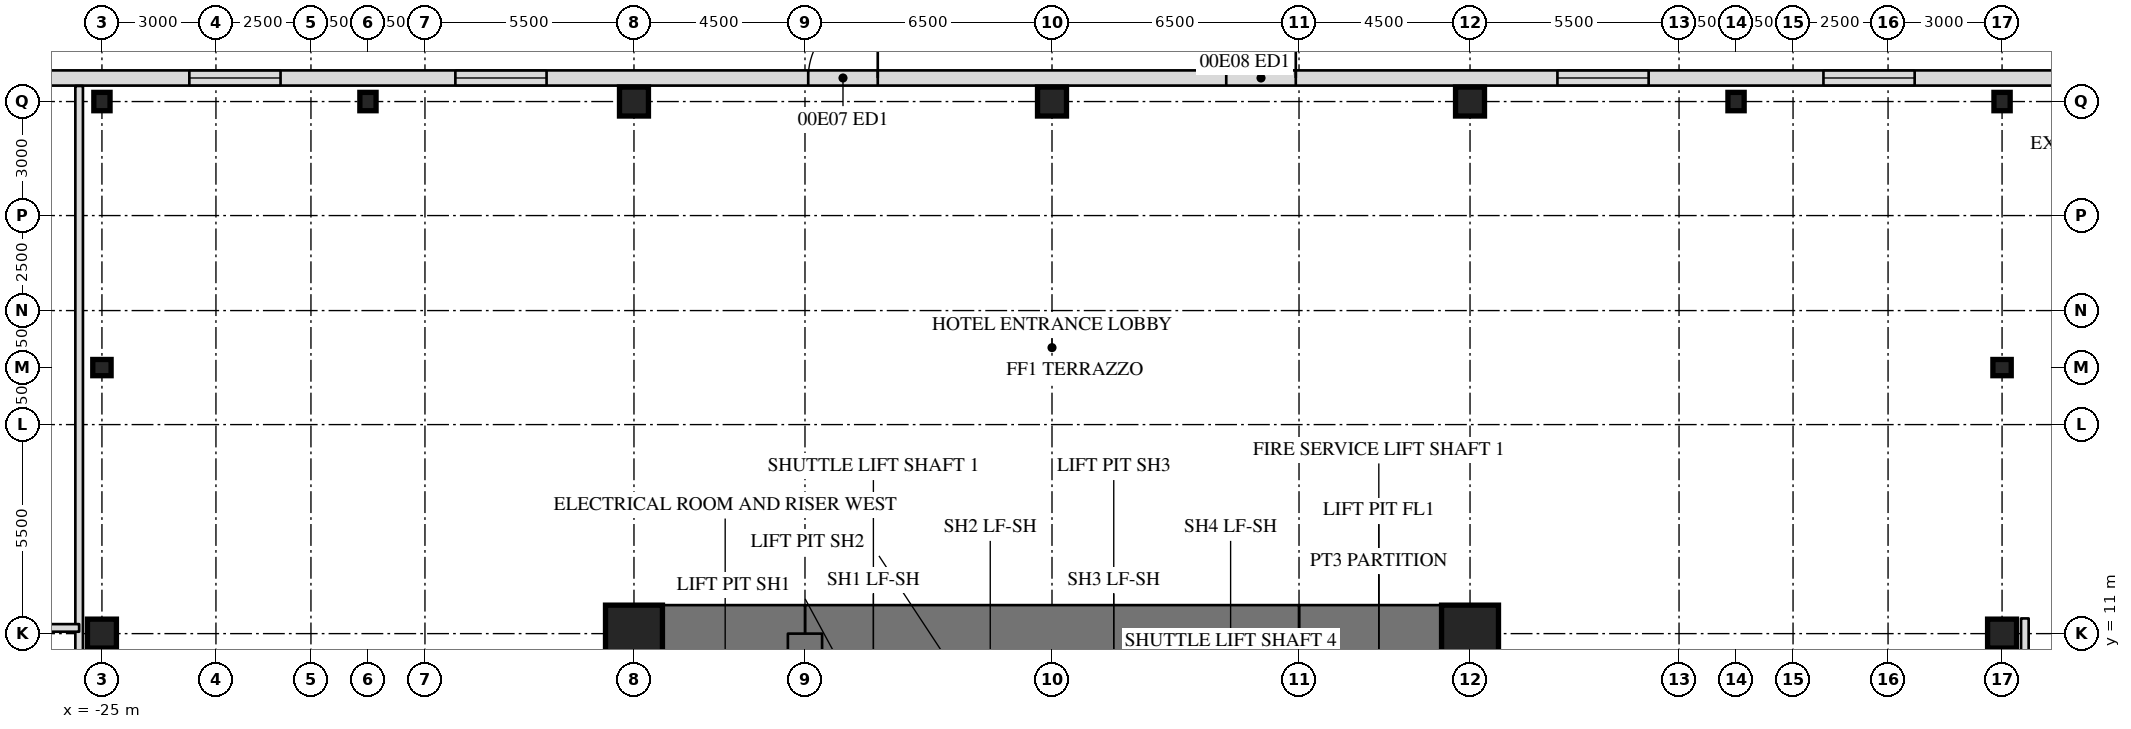
"""IFC4 building model, lengths in metres.
Left out: names, types, materials, properties, quantities, classifications, styles, units other than length and angle.
Written with IfcOpenShell. Run it as: python <this file> out.ifc"""

import sys

from ifc_helpers import new_model, si_unit, direction, frame, frame_2d, origin, origin_2d, place, context, subcontext, project, spatial, rectangle, hollow_rectangle, i_section, extrude, element, fill, save


model = new_model("IFC4")
c1 = context("Model", 3, precision=1e-05, world=origin(), true_north=direction((0.0, 1.0)))
c2 = subcontext(c1, "Body", "Model", "MODEL_VIEW")
j1 = project(units=[si_unit("LENGTHUNIT", "METRE"), si_unit("PLANEANGLEUNIT", "RADIAN")], contexts=[c1])
p1 = place(None, origin())
s1 = spatial("IfcSite", under=j1, at=p1, CompositionType="ELEMENT")
p2 = place(p1, origin())
s2 = spatial("IfcBuilding", under=s1, at=p2, CompositionType="ELEMENT")
p3 = place(p2, origin())
s3 = spatial("IfcBuildingStorey", under=s2, at=p3, CompositionType="ELEMENT", Elevation=0.0)
p4 = place(p3, frame((25.0, 11.0, -0.3), z_axis=(0.0, 0.0, 1.0), x_axis=(0.0, 1.0, 0.0)))
e1 = element("IfcColumn", 1, at=p4, inside=s3, PredefinedType="COLUMN", context=c2, shape_type="SweptSolid", body=[
    extrude(hollow_rectangle(XDim=0.762, YDim=0.762, WallThickness=0.152, at=origin_2d()), origin(), (0.0, 0.0, 1.0), 6.3),
])
for number, where, z_axis, x_axis in (
    (2, (25.0, 18.0, -0.3), (0.0, 0.0, 1.0), (0.0, 1.0, 0.0)),
    (3, (25.0, 25.0, -0.3), (0.0, 0.0, 1.0), (1.0, 0.0, 0.0)),
    (4, (18.0, 25.0, -0.3), (0.0, 0.0, 1.0), (1.0, 0.0, 0.0)),
):
    element("IfcColumn", number, at=place(p3, frame(where, z_axis=z_axis, x_axis=x_axis)), inside=s3, PredefinedType="COLUMN", context=c2, shape_type="SweptSolid", body=[
        extrude(i_section(OverallWidth=0.427, OverallDepth=0.483, WebThickness=0.051, FlangeThickness=0.082, at=origin_2d()), origin(), (0.0, 0.0, 1.0), 6.3),
    ])
for number, where, z_axis, x_axis in (
    (5, (11.0, 25.0, -0.3), (0.0, 0.0, 1.0), (1.0, 0.0, 0.0)),
    (6, (0.0, 25.0, -0.3), (0.0, 0.0, 1.0), (1.0, 0.0, 0.0)),
    (7, (-11.0, 25.0, -0.3), (0.0, 0.0, 1.0), (1.0, 0.0, 0.0)),
):
    element("IfcColumn", number, at=place(p3, frame(where, z_axis=z_axis, x_axis=x_axis)), inside=s3, PredefinedType="COLUMN", context=c2, shape_type="SweptSolid", body=[
        extrude(hollow_rectangle(XDim=0.762, YDim=0.762, WallThickness=0.152, at=origin_2d()), origin(), (0.0, 0.0, 1.0), 6.3),
    ])
for number, where, z_axis, x_axis in (
    (8, (-18.0, 25.0, -0.3), (0.0, 0.0, 1.0), (1.0, 0.0, 0.0)),
    (9, (-25.0, 25.0, -0.3), (0.0, 0.0, 1.0), (1.0, 0.0, 0.0)),
    (10, (-25.0, 18.0, -0.3), (0.0, 0.0, 1.0), (0.0, 1.0, 0.0)),
):
    element("IfcColumn", number, at=place(p3, frame(where, z_axis=z_axis, x_axis=x_axis)), inside=s3, PredefinedType="COLUMN", context=c2, shape_type="SweptSolid", body=[
        extrude(i_section(OverallWidth=0.427, OverallDepth=0.483, WebThickness=0.051, FlangeThickness=0.082, at=origin_2d()), origin(), (0.0, 0.0, 1.0), 6.3),
    ])
p5 = place(p3, frame((-25.0, 11.0, -0.3), z_axis=(0.0, 0.0, 1.0), x_axis=(0.0, 1.0, 0.0)))
e11 = element("IfcColumn", 11, at=p5, inside=s3, PredefinedType="COLUMN", context=c2, shape_type="SweptSolid", body=[
    extrude(hollow_rectangle(XDim=0.762, YDim=0.762, WallThickness=0.152, at=origin_2d()), origin(), (0.0, 0.0, 1.0), 6.3),
])
p6 = place(p3, frame((11.0, -11.0, -0.3), z_axis=(0.0, 0.0, 1.0), x_axis=(0.0, 1.0, 0.0)))
e12 = element("IfcWall", 12, at=p6, inside=s3, PredefinedType="SHEAR", context=c2, shape_type="SweptSolid", body=[
    extrude(rectangle(XDim=22.0, YDim=1.5, at=frame_2d((11.0, 0.0))), origin(), (0.0, 0.0, 1.0), 6.3),
])
p7 = place(p6, frame((15.393, 0.0, 0.3)))
e13 = element("IfcOpeningElement", 13, at=p7, cuts=e12, PredefinedType="OPENING", context=c2, shape_type="SweptSolid", body=[
    extrude(rectangle(XDim=0.915, YDim=2.134, at=frame_2d((0.458, 1.067))), frame((0.0, 0.76, 0.0), z_axis=(0.0, -1.0, 0.0), x_axis=(1.0, 0.0, 0.0)), (0.0, 0.0, 1.0), 1.52),
])
p8 = place(p3, frame((-11.0, 11.0, -0.3), z_axis=(0.0, 0.0, 1.0), x_axis=(0.0, -1.0, 0.0)))
e14 = element("IfcWall", 14, at=p8, inside=s3, PredefinedType="SHEAR", context=c2, shape_type="SweptSolid", body=[
    extrude(rectangle(XDim=22.0, YDim=1.5, at=frame_2d((11.0, 0.0))), origin(), (0.0, 0.0, 1.0), 6.3),
])
p9 = place(p8, frame((15.393, 0.0, 0.3)))
e15 = element("IfcOpeningElement", 15, at=p9, cuts=e14, PredefinedType="OPENING", context=c2, shape_type="SweptSolid", body=[
    extrude(rectangle(XDim=0.915, YDim=2.134, at=frame_2d((0.458, 1.067))), frame((0.0, 0.76, 0.0), z_axis=(0.0, -1.0, 0.0), x_axis=(1.0, 0.0, 0.0)), (0.0, 0.0, 1.0), 1.52),
])
p10 = place(p3, frame((11.0, 11.0, -0.3), z_axis=(0.0, 0.0, 1.0), x_axis=(-1.0, 0.0, 0.0)))
e16 = element("IfcWall", 16, at=p10, inside=s3, PredefinedType="SHEAR", context=c2, shape_type="SweptSolid", body=[
    extrude(rectangle(XDim=4.5, YDim=1.5, at=frame_2d((2.25, 0.0))), origin(), (0.0, 0.0, 1.0), 6.3),
])
p11 = place(p3, frame((6.5, 11.0, -0.3), z_axis=(0.0, 0.0, 1.0), x_axis=(-1.0, 0.0, 0.0)))
e17 = element("IfcWall", 17, at=p11, inside=s3, PredefinedType="SHEAR", context=c2, shape_type="SweptSolid", body=[
    extrude(rectangle(XDim=13.0, YDim=1.5, at=frame_2d((6.5, 0.0))), origin(), (0.0, 0.0, 1.0), 6.3),
])
p12 = place(p3, frame((-6.5, 11.0, -0.3), z_axis=(0.0, 0.0, 1.0), x_axis=(-1.0, 0.0, 0.0)))
e18 = element("IfcWall", 18, at=p12, inside=s3, PredefinedType="SHEAR", context=c2, shape_type="SweptSolid", body=[
    extrude(rectangle(XDim=4.5, YDim=1.5, at=frame_2d((2.25, 0.0))), origin(), (0.0, 0.0, 1.0), 6.3),
])
for number, where, z_axis, x_axis in (
    (19, (6.5, 6.5, -0.3), (0.0, 0.0, 1.0), (0.0, 1.0, 0.0)),
    (20, (-6.5, 11.0, -0.3), (0.0, 0.0, 1.0), (0.0, -1.0, 0.0)),
):
    element("IfcWall", number, at=place(p3, frame(where, z_axis=z_axis, x_axis=x_axis)), inside=s3, PredefinedType="SHEAR", context=c2, shape_type="SweptSolid", body=[
        extrude(rectangle(XDim=4.5, YDim=0.9, at=frame_2d((2.25, 0.0))), origin(), (0.0, 0.0, 1.0), 6.3),
    ])
for number, where, z_axis, x_axis in (
    (21, (11.0, 11.0, -0.3), (0.0, 0.0, 1.0), (1.0, 0.0, 0.0)),
    (22, (-11.0, 11.0, -0.3), (0.0, 0.0, 1.0), (1.0, 0.0, 0.0)),
):
    element("IfcColumn", number, at=place(p3, frame(where, z_axis=z_axis, x_axis=x_axis)), inside=s3, PredefinedType="COLUMN", context=c2, shape_type="SweptSolid", body=[
        extrude(hollow_rectangle(XDim=1.499, YDim=1.499, WallThickness=0.102, at=origin_2d()), origin(), (0.0, 0.0, 1.0), 6.3),
    ])
p13 = place(p3, frame((39.82, 25.62, -0.3), z_axis=(0.0, 0.0, 1.0), x_axis=(-1.0, 0.0, 0.0)))
e23 = element("IfcWall", 23, at=p13, inside=s3, PredefinedType="SOLIDWALL", context=c2, shape_type="SweptSolid", body=[
    extrude(rectangle(XDim=79.64, YDim=0.4, at=frame_2d((39.82, 0.0))), origin(), (0.0, 0.0, 1.0), 6.11),
])
p14 = place(p13, frame((74.12, 0.0, 1.2)))
e24 = element("IfcOpeningElement", 24, at=p14, cuts=e23, PredefinedType="OPENING", context=c2, shape_type="SweptSolid", body=[
    extrude(rectangle(XDim=2.4, YDim=4.2, at=frame_2d((1.2, 2.1))), frame((0.0, 0.21, 0.0), z_axis=(0.0, -1.0, 0.0), x_axis=(1.0, 0.0, 0.0)), (0.0, 0.0, 1.0), 0.42),
])
p15 = place(p13, frame((67.785, 0.0, 0.3)))
e25 = element("IfcOpeningElement", 25, at=p15, cuts=e23, PredefinedType="OPENING", context=c2, shape_type="SweptSolid", body=[
    extrude(rectangle(XDim=1.07, YDim=2.44, at=frame_2d((0.535, 1.22))), frame((0.0, 0.21, 0.0), z_axis=(0.0, -1.0, 0.0), x_axis=(1.0, 0.0, 0.0)), (0.0, 0.0, 1.0), 0.42),
])
p16 = place(p13, frame((60.12, 0.0, 1.2)))
e26 = element("IfcOpeningElement", 26, at=p16, cuts=e23, PredefinedType="OPENING", context=c2, shape_type="SweptSolid", body=[
    extrude(rectangle(XDim=2.4, YDim=4.2, at=frame_2d((1.2, 2.1))), frame((0.0, 0.21, 0.0), z_axis=(0.0, -1.0, 0.0), x_axis=(1.0, 0.0, 0.0)), (0.0, 0.0, 1.0), 0.42),
])
p17 = place(p13, frame((53.12, 0.0, 1.2)))
e27 = element("IfcOpeningElement", 27, at=p17, cuts=e23, PredefinedType="OPENING", context=c2, shape_type="SweptSolid", body=[
    extrude(rectangle(XDim=2.4, YDim=4.2, at=frame_2d((1.2, 2.1))), frame((0.0, 0.21, 0.0), z_axis=(0.0, -1.0, 0.0), x_axis=(1.0, 0.0, 0.0)), (0.0, 0.0, 1.0), 0.42),
])
p18 = place(p13, frame((44.405, 0.0, 0.3)))
e28 = element("IfcOpeningElement", 28, at=p18, cuts=e23, PredefinedType="OPENING", context=c2, shape_type="SweptSolid", body=[
    extrude(rectangle(XDim=1.83, YDim=2.44, at=frame_2d((0.915, 1.22))), frame((0.0, 0.21, 0.0), z_axis=(0.0, -1.0, 0.0), x_axis=(1.0, 0.0, 0.0)), (0.0, 0.0, 1.0), 0.42),
])
p19 = place(p13, frame((33.405, 0.0, 0.3)))
e29 = element("IfcOpeningElement", 29, at=p19, cuts=e23, PredefinedType="OPENING", context=c2, shape_type="SweptSolid", body=[
    extrude(rectangle(XDim=1.83, YDim=2.44, at=frame_2d((0.915, 1.22))), frame((0.0, 0.21, 0.0), z_axis=(0.0, -1.0, 0.0), x_axis=(1.0, 0.0, 0.0)), (0.0, 0.0, 1.0), 0.42),
])
p20 = place(p13, frame((24.12, 0.0, 1.2)))
e30 = element("IfcOpeningElement", 30, at=p20, cuts=e23, PredefinedType="OPENING", context=c2, shape_type="SweptSolid", body=[
    extrude(rectangle(XDim=2.4, YDim=4.2, at=frame_2d((1.2, 2.1))), frame((0.0, 0.21, 0.0), z_axis=(0.0, -1.0, 0.0), x_axis=(1.0, 0.0, 0.0)), (0.0, 0.0, 1.0), 0.42),
])
p21 = place(p13, frame((17.12, 0.0, 1.2)))
e31 = element("IfcOpeningElement", 31, at=p21, cuts=e23, PredefinedType="OPENING", context=c2, shape_type="SweptSolid", body=[
    extrude(rectangle(XDim=2.4, YDim=4.2, at=frame_2d((1.2, 2.1))), frame((0.0, 0.21, 0.0), z_axis=(0.0, -1.0, 0.0), x_axis=(1.0, 0.0, 0.0)), (0.0, 0.0, 1.0), 0.42),
])
p22 = place(p13, frame((3.12, 0.0, 1.2)))
e32 = element("IfcOpeningElement", 32, at=p22, cuts=e23, PredefinedType="OPENING", context=c2, shape_type="SweptSolid", body=[
    extrude(rectangle(XDim=2.4, YDim=4.2, at=frame_2d((1.2, 2.1))), frame((0.0, 0.21, 0.0), z_axis=(0.0, -1.0, 0.0), x_axis=(1.0, 0.0, 0.0)), (0.0, 0.0, 1.0), 0.42),
])
p23 = place(p13, frame((10.785, 0.0, 0.3)))
e33 = element("IfcOpeningElement", 33, at=p23, cuts=e23, PredefinedType="OPENING", context=c2, shape_type="SweptSolid", body=[
    extrude(rectangle(XDim=1.07, YDim=2.13, at=frame_2d((0.535, 1.065))), frame((0.0, 0.21, 0.0), z_axis=(0.0, -1.0, 0.0), x_axis=(1.0, 0.0, 0.0)), (0.0, 0.0, 1.0), 0.42),
])
p24 = place(p3, frame((25.6, -25.41, 0.0), z_axis=(0.0, 0.0, 1.0), x_axis=(0.0, 1.0, 0.0)))
e34 = element("IfcWall", 34, at=p24, inside=s3, PredefinedType="PARTITIONING", context=c2, shape_type="SweptSolid", body=[
    extrude(rectangle(XDim=36.81, YDim=0.2, at=frame_2d((18.405, 0.0))), origin(), (0.0, 0.0, 1.0), 5.81),
])
p25 = place(p24, frame((29.995, 0.0, 0.3)))
e35 = element("IfcOpeningElement", 35, at=p25, cuts=e34, PredefinedType="OPENING", context=c2, shape_type="SweptSolid", body=[
    extrude(rectangle(XDim=1.83, YDim=2.134, at=frame_2d((0.915, 1.067))), frame((0.0, 0.11, 0.0), z_axis=(0.0, -1.0, 0.0), x_axis=(1.0, 0.0, 0.0)), (0.0, 0.0, 1.0), 0.22),
])
p26 = place(p24, frame((18.995, 0.0, 0.3)))
e36 = element("IfcOpeningElement", 36, at=p26, cuts=e34, PredefinedType="OPENING", context=c2, shape_type="SweptSolid", body=[
    extrude(rectangle(XDim=1.83, YDim=2.134, at=frame_2d((0.915, 1.067))), frame((0.0, 0.11, 0.0), z_axis=(0.0, -1.0, 0.0), x_axis=(1.0, 0.0, 0.0)), (0.0, 0.0, 1.0), 0.22),
])
p27 = place(p3, frame((-25.6, 25.41, 0.0), z_axis=(0.0, 0.0, 1.0), x_axis=(0.0, -1.0, 0.0)))
e37 = element("IfcWall", 37, at=p27, inside=s3, PredefinedType="PARTITIONING", context=c2, shape_type="SweptSolid", body=[
    extrude(rectangle(XDim=36.81, YDim=0.2, at=frame_2d((18.405, 0.0))), origin(), (0.0, 0.0, 1.0), 5.81),
])
p28 = place(p27, frame((29.995, 0.0, 0.3)))
e38 = element("IfcOpeningElement", 38, at=p28, cuts=e37, PredefinedType="OPENING", context=c2, shape_type="SweptSolid", body=[
    extrude(rectangle(XDim=1.83, YDim=2.134, at=frame_2d((0.915, 1.067))), frame((0.0, 0.11, 0.0), z_axis=(0.0, -1.0, 0.0), x_axis=(1.0, 0.0, 0.0)), (0.0, 0.0, 1.0), 0.22),
])
p29 = place(p27, frame((18.995, 0.0, 0.3)))
e39 = element("IfcOpeningElement", 39, at=p29, cuts=e37, PredefinedType="OPENING", context=c2, shape_type="SweptSolid", body=[
    extrude(rectangle(XDim=1.83, YDim=2.134, at=frame_2d((0.915, 1.067))), frame((0.0, 0.11, 0.0), z_axis=(0.0, -1.0, 0.0), x_axis=(1.0, 0.0, 0.0)), (0.0, 0.0, 1.0), 0.22),
])
p30 = place(p3, frame((-25.6, 11.15, 0.0), z_axis=(0.0, 0.0, 1.0), x_axis=(-1.0, 0.0, 0.0)))
e40 = element("IfcWall", 40, at=p30, inside=s3, PredefinedType="PARTITIONING", context=c2, shape_type="SweptSolid", body=[
    extrude(rectangle(XDim=13.81, YDim=0.2, at=frame_2d((6.905, 0.0))), origin(), (0.0, 0.0, 1.0), 5.198),
])
p31 = place(p16, origin())
e41 = element("IfcWindow", 41, at=p31, inside=s3, PartitioningType="SINGLE_PANEL", PredefinedType="WINDOW", context=c2, shape_type="SweptSolid", body=[
    extrude(rectangle(XDim=2.4, YDim=4.2, at=frame_2d((1.2, 2.1))), frame((0.0, 0.03, 0.0), z_axis=(0.0, -1.0, 0.0), x_axis=(1.0, 0.0, 0.0)), (0.0, 0.0, 1.0), 0.06),
])
fill(e26, e41)
p32 = place(p17, origin())
e42 = element("IfcWindow", 42, at=p32, inside=s3, PartitioningType="SINGLE_PANEL", PredefinedType="WINDOW", context=c2, shape_type="SweptSolid", body=[
    extrude(rectangle(XDim=2.4, YDim=4.2, at=frame_2d((1.2, 2.1))), frame((0.0, 0.03, 0.0), z_axis=(0.0, -1.0, 0.0), x_axis=(1.0, 0.0, 0.0)), (0.0, 0.0, 1.0), 0.06),
])
fill(e27, e42)
p33 = place(p18, frame((1.83, 0.0, 0.0), z_axis=(0.0, 0.0, 1.0), x_axis=(-1.0, 0.0, 0.0)))
e43 = element("IfcDoor", 43, at=p33, inside=s3, OperationType="SINGLE_SWING_LEFT", PredefinedType="DOOR", context=c2, shape_type="SweptSolid", body=[
    extrude(rectangle(XDim=1.83, YDim=2.44, at=frame_2d((0.915, 1.22))), frame((0.0, 0.025, 0.0), z_axis=(0.0, -1.0, 0.0), x_axis=(1.0, 0.0, 0.0)), (0.0, 0.0, 1.0), 0.05),
])
fill(e28, e43)
p34 = place(p19, frame((1.83, 0.0, 0.0), z_axis=(0.0, 0.0, 1.0), x_axis=(-1.0, 0.0, 0.0)))
e44 = element("IfcDoor", 44, at=p34, inside=s3, OperationType="SINGLE_SWING_LEFT", PredefinedType="DOOR", context=c2, shape_type="SweptSolid", body=[
    extrude(rectangle(XDim=1.83, YDim=2.44, at=frame_2d((0.915, 1.22))), frame((0.0, 0.025, 0.0), z_axis=(0.0, -1.0, 0.0), x_axis=(1.0, 0.0, 0.0)), (0.0, 0.0, 1.0), 0.05),
])
fill(e29, e44)
p35 = place(p20, origin())
e45 = element("IfcWindow", 45, at=p35, inside=s3, PartitioningType="SINGLE_PANEL", PredefinedType="WINDOW", context=c2, shape_type="SweptSolid", body=[
    extrude(rectangle(XDim=2.4, YDim=4.2, at=frame_2d((1.2, 2.1))), frame((0.0, 0.03, 0.0), z_axis=(0.0, -1.0, 0.0), x_axis=(1.0, 0.0, 0.0)), (0.0, 0.0, 1.0), 0.06),
])
fill(e30, e45)
p36 = place(p21, origin())
e46 = element("IfcWindow", 46, at=p36, inside=s3, PartitioningType="SINGLE_PANEL", PredefinedType="WINDOW", context=c2, shape_type="SweptSolid", body=[
    extrude(rectangle(XDim=2.4, YDim=4.2, at=frame_2d((1.2, 2.1))), frame((0.0, 0.03, 0.0), z_axis=(0.0, -1.0, 0.0), x_axis=(1.0, 0.0, 0.0)), (0.0, 0.0, 1.0), 0.06),
])
fill(e31, e46)
save(model, sys.argv[1])
